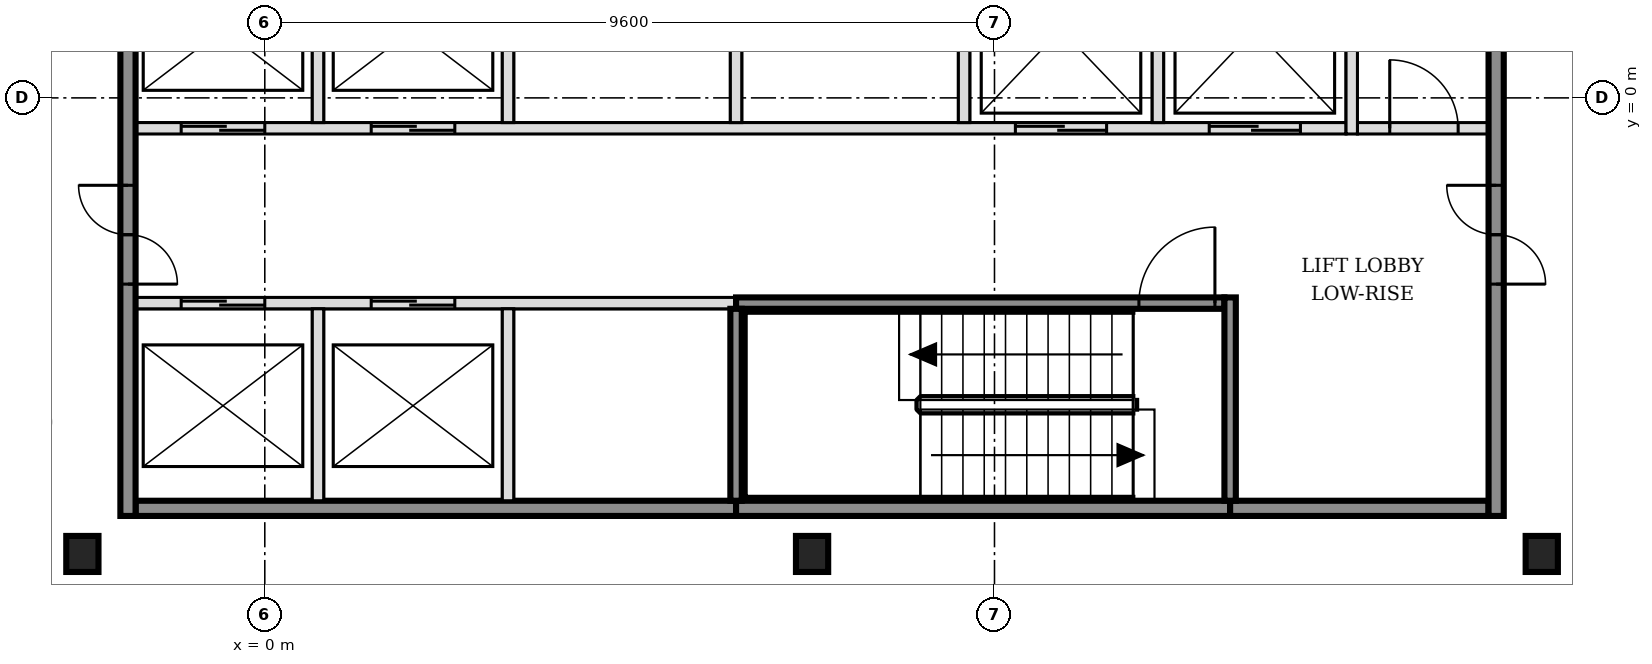
"""IFC4 building model, lengths in metres.
Left out: names, types, materials, properties, quantities, classifications, styles, units other than length and angle.
Written with IfcOpenShell. Run it as: python <this file> out.ifc"""

import sys

from ifc_helpers import new_model, si_unit, direction, frame, frame_2d, origin, origin_2d, place, context, subcontext, project, spatial, rectangle, i_section, extrude, element, fill, save


model = new_model("IFC4")
c1 = context("Model", 3, precision=1e-05, world=origin(), true_north=direction((0.0, 1.0)))
c2 = subcontext(c1, "Body", "Model", "MODEL_VIEW")
j1 = project(units=[si_unit("LENGTHUNIT", "METRE"), si_unit("PLANEANGLEUNIT", "RADIAN")], contexts=[c1])
p1 = place(None, origin())
s1 = spatial("IfcSite", under=j1, at=p1, CompositionType="ELEMENT")
p2 = place(p1, origin())
s2 = spatial("IfcBuilding", under=s1, at=p2, CompositionType="ELEMENT")
p3 = place(p2, frame((0.0, 0.0, 105.0)))
s3 = spatial("IfcBuildingStorey", under=s2, at=p3, CompositionType="ELEMENT", Elevation=105.0)
for number, where, z_axis, x_axis in (
    (1, (-2.4, -6.0, -0.15), (0.0, 0.0, 1.0), (1.0, 0.0, 0.0)),
    (2, (7.2, -6.0, -0.15), (0.0, 0.0, 1.0), (1.0, 0.0, 0.0)),
    (3, (16.8, -6.0, -0.15), (0.0, 0.0, 1.0), (1.0, 0.0, 0.0)),
):
    element("IfcColumn", number, at=place(p3, frame(where, z_axis=z_axis, x_axis=x_axis)), inside=s3, PredefinedType="COLUMN", context=c2, shape_type="SweptSolid", body=[
        extrude(i_section(OverallWidth=0.424, OverallDepth=0.474, WebThickness=0.048, FlangeThickness=0.077, FilletRadius=0.015, at=origin_2d()), origin(), (0.0, 0.0, 1.0), 3.6),
    ])
p4 = place(p3, frame((-1.7, -5.4, 0.0), z_axis=(0.0, 0.0, 1.0), x_axis=(1.0, 0.0, 0.0)))
e4 = element("IfcWall", 4, at=p4, inside=s3, PredefinedType="SOLIDWALL", context=c2, shape_type="SweptSolid", body=[
    extrude(rectangle(XDim=7.9, YDim=0.2, at=frame_2d((3.95, 0.0))), origin(), (0.0, 0.0, 1.0), 3.45),
])
p5 = place(p3, frame((6.2, -5.4, 0.0), z_axis=(0.0, 0.0, 1.0), x_axis=(1.0, 0.0, 0.0)))
e5 = element("IfcWall", 5, at=p5, inside=s3, PredefinedType="SOLIDWALL", context=c2, shape_type="SweptSolid", body=[
    extrude(rectangle(XDim=6.5, YDim=0.2, at=frame_2d((3.25, 0.0))), origin(), (0.0, 0.0, 1.0), 3.45),
])
p6 = place(p3, frame((12.7, -5.4, 0.0), z_axis=(0.0, 0.0, 1.0), x_axis=(1.0, 0.0, 0.0)))
e6 = element("IfcWall", 6, at=p6, inside=s3, PredefinedType="SOLIDWALL", context=c2, shape_type="SweptSolid", body=[
    extrude(rectangle(XDim=3.4, YDim=0.2, at=frame_2d((1.7, 0.0))), origin(), (0.0, 0.0, 1.0), 3.45),
])
p7 = place(p3, frame((-1.7, -2.7, 0.0), z_axis=(0.0, 0.0, 1.0), x_axis=(1.0, 0.0, 0.0)))
e7 = element("IfcWall", 7, at=p7, inside=s3, PredefinedType="SOLIDWALL", context=c2, shape_type="SweptSolid", body=[
    extrude(rectangle(XDim=7.9, YDim=0.15, at=frame_2d((3.95, 0.0))), origin(), (0.0, 0.0, 1.0), 3.45),
])
p8 = place(p7, frame((0.6, 0.0, 0.0)))
e8 = element("IfcOpeningElement", 8, at=p8, cuts=e7, PredefinedType="OPENING", context=c2, shape_type="SweptSolid", body=[
    extrude(rectangle(XDim=1.1, YDim=2.1, at=frame_2d((0.55, 1.05))), frame((0.0, 0.085, 0.0), z_axis=(0.0, -1.0, 0.0), x_axis=(1.0, 0.0, 0.0)), (0.0, 0.0, 1.0), 0.17),
])
p9 = place(p7, frame((3.1, 0.0, 0.0)))
e9 = element("IfcOpeningElement", 9, at=p9, cuts=e7, PredefinedType="OPENING", context=c2, shape_type="SweptSolid", body=[
    extrude(rectangle(XDim=1.1, YDim=2.1, at=frame_2d((0.55, 1.05))), frame((0.0, 0.085, 0.0), z_axis=(0.0, -1.0, 0.0), x_axis=(1.0, 0.0, 0.0)), (0.0, 0.0, 1.0), 0.17),
])
p10 = place(p3, frame((6.2, -2.7, 0.0), z_axis=(0.0, 0.0, 1.0), x_axis=(1.0, 0.0, 0.0)))
e10 = element("IfcWall", 10, at=p10, inside=s3, PredefinedType="SOLIDWALL", context=c2, shape_type="SweptSolid", body=[
    extrude(rectangle(XDim=6.425, YDim=0.15, at=frame_2d((3.212, 0.0))), origin(), (0.0, 0.0, 1.0), 3.45),
])
p11 = place(p10, frame((5.3, 0.0, 0.0)))
e11 = element("IfcOpeningElement", 11, at=p11, cuts=e10, PredefinedType="OPENING", context=c2, shape_type="SweptSolid", body=[
    extrude(rectangle(XDim=1.0, YDim=2.1, at=frame_2d((0.5, 1.05))), frame((0.0, 0.085, 0.0), z_axis=(0.0, -1.0, 0.0), x_axis=(1.0, 0.0, 0.0)), (0.0, 0.0, 1.0), 0.17),
])
p12 = place(p3, frame((-1.7, -0.4, 0.0), z_axis=(0.0, 0.0, 1.0), x_axis=(1.0, 0.0, 0.0)))
e12 = element("IfcWall", 12, at=p12, inside=s3, PredefinedType="SOLIDWALL", context=c2, shape_type="SweptSolid", body=[
    extrude(rectangle(XDim=15.925, YDim=0.15, at=frame_2d((7.962, 0.0))), origin(), (0.0, 0.0, 1.0), 3.45),
])
p13 = place(p12, frame((0.6, 0.0, 0.0)))
e13 = element("IfcOpeningElement", 13, at=p13, cuts=e12, PredefinedType="OPENING", context=c2, shape_type="SweptSolid", body=[
    extrude(rectangle(XDim=1.1, YDim=2.1, at=frame_2d((0.55, 1.05))), frame((0.0, 0.085, 0.0), z_axis=(0.0, -1.0, 0.0), x_axis=(1.0, 0.0, 0.0)), (0.0, 0.0, 1.0), 0.17),
])
p14 = place(p12, frame((3.1, 0.0, 0.0)))
e14 = element("IfcOpeningElement", 14, at=p14, cuts=e12, PredefinedType="OPENING", context=c2, shape_type="SweptSolid", body=[
    extrude(rectangle(XDim=1.1, YDim=2.1, at=frame_2d((0.55, 1.05))), frame((0.0, 0.085, 0.0), z_axis=(0.0, -1.0, 0.0), x_axis=(1.0, 0.0, 0.0)), (0.0, 0.0, 1.0), 0.17),
])
p15 = place(p12, frame((11.575, 0.0, 0.0)))
e15 = element("IfcOpeningElement", 15, at=p15, cuts=e12, PredefinedType="OPENING", context=c2, shape_type="SweptSolid", body=[
    extrude(rectangle(XDim=1.2, YDim=2.1, at=frame_2d((0.6, 1.05))), frame((0.0, 0.085, 0.0), z_axis=(0.0, -1.0, 0.0), x_axis=(1.0, 0.0, 0.0)), (0.0, 0.0, 1.0), 0.17),
])
p16 = place(p12, frame((14.125, 0.0, 0.0)))
e16 = element("IfcOpeningElement", 16, at=p16, cuts=e12, PredefinedType="OPENING", context=c2, shape_type="SweptSolid", body=[
    extrude(rectangle(XDim=1.2, YDim=2.1, at=frame_2d((0.6, 1.05))), frame((0.0, 0.085, 0.0), z_axis=(0.0, -1.0, 0.0), x_axis=(1.0, 0.0, 0.0)), (0.0, 0.0, 1.0), 0.17),
])
p17 = place(p3, frame((14.375, -0.4, 0.0), z_axis=(0.0, 0.0, 1.0), x_axis=(1.0, 0.0, 0.0)))
e17 = element("IfcWall", 17, at=p17, inside=s3, PredefinedType="PARTITIONING", context=c2, shape_type="SweptSolid", body=[
    extrude(rectangle(XDim=1.725, YDim=0.15, at=frame_2d((0.863, 0.0))), origin(), (0.0, 0.0, 1.0), 3.45),
])
p18 = place(p17, frame((0.425, 0.0, 0.0)))
e18 = element("IfcOpeningElement", 18, at=p18, cuts=e17, PredefinedType="OPENING", context=c2, shape_type="SweptSolid", body=[
    extrude(rectangle(XDim=0.9, YDim=2.1, at=frame_2d((0.45, 1.05))), frame((0.0, 0.085, 0.0), z_axis=(0.0, -1.0, 0.0), x_axis=(1.0, 0.0, 0.0)), (0.0, 0.0, 1.0), 0.17),
])
p19 = place(p3, frame((-1.8, -5.5, 0.0), z_axis=(0.0, 0.0, 1.0), x_axis=(0.0, 1.0, 0.0)))
e19 = element("IfcWall", 19, at=p19, inside=s3, PredefinedType="SOLIDWALL", context=c2, shape_type="SweptSolid", body=[
    extrude(rectangle(XDim=15.8, YDim=0.2, at=frame_2d((7.9, 0.0))), origin(), (0.0, 0.0, 1.0), 3.45),
])
p20 = place(p19, frame((3.05, 0.0, 0.0)))
e20 = element("IfcOpeningElement", 20, at=p20, cuts=e19, PredefinedType="OPENING", context=c2, shape_type="SweptSolid", body=[
    extrude(rectangle(XDim=1.3, YDim=2.1, at=frame_2d((0.65, 1.05))), frame((0.0, 0.11, 0.0), z_axis=(0.0, -1.0, 0.0), x_axis=(1.0, 0.0, 0.0)), (0.0, 0.0, 1.0), 0.22),
])
p21 = place(p19, frame((11.45, 0.0, 0.0)))
e21 = element("IfcOpeningElement", 21, at=p21, cuts=e19, PredefinedType="OPENING", context=c2, shape_type="SweptSolid", body=[
    extrude(rectangle(XDim=1.3, YDim=2.1, at=frame_2d((0.65, 1.05))), frame((0.0, 0.11, 0.0), z_axis=(0.0, -1.0, 0.0), x_axis=(1.0, 0.0, 0.0)), (0.0, 0.0, 1.0), 0.22),
])
p22 = place(p3, frame((0.7, -5.3, 0.0), z_axis=(0.0, 0.0, 1.0), x_axis=(0.0, 1.0, 0.0)))
e22 = element("IfcWall", 22, at=p22, inside=s3, PredefinedType="SOLIDWALL", context=c2, shape_type="SweptSolid", body=[
    extrude(rectangle(XDim=2.525, YDim=0.15, at=frame_2d((1.263, 0.0))), origin(), (0.0, 0.0, 1.0), 3.45),
])
p23 = place(p3, frame((0.7, -0.325, 0.0), z_axis=(0.0, 0.0, 1.0), x_axis=(0.0, 1.0, 0.0)))
e23 = element("IfcWall", 23, at=p23, inside=s3, PredefinedType="SOLIDWALL", context=c2, shape_type="SweptSolid", body=[
    extrude(rectangle(XDim=2.45, YDim=0.15, at=frame_2d((1.225, 0.0))), origin(), (0.0, 0.0, 1.0), 3.45),
])
p24 = place(p3, frame((3.2, -5.3, 0.0), z_axis=(0.0, 0.0, 1.0), x_axis=(0.0, 1.0, 0.0)))
e24 = element("IfcWall", 24, at=p24, inside=s3, PredefinedType="SOLIDWALL", context=c2, shape_type="SweptSolid", body=[
    extrude(rectangle(XDim=2.525, YDim=0.15, at=frame_2d((1.263, 0.0))), origin(), (0.0, 0.0, 1.0), 3.45),
])
p25 = place(p3, frame((3.2, -0.325, 0.0), z_axis=(0.0, 0.0, 1.0), x_axis=(0.0, 1.0, 0.0)))
e25 = element("IfcWall", 25, at=p25, inside=s3, PredefinedType="SOLIDWALL", context=c2, shape_type="SweptSolid", body=[
    extrude(rectangle(XDim=2.45, YDim=0.15, at=frame_2d((1.225, 0.0))), origin(), (0.0, 0.0, 1.0), 3.45),
])
p26 = place(p3, frame((6.2, -5.3, 0.0), z_axis=(0.0, 0.0, 1.0), x_axis=(0.0, 1.0, 0.0)))
e26 = element("IfcWall", 26, at=p26, inside=s3, PredefinedType="SOLIDWALL", context=c2, shape_type="SweptSolid", body=[
    extrude(rectangle(XDim=2.525, YDim=0.15, at=frame_2d((1.263, 0.0))), origin(), (0.0, 0.0, 1.0), 3.45),
])
for number, where, z_axis, x_axis in (
    (27, (6.2, -0.325, 0.0), (0.0, 0.0, 1.0), (0.0, 1.0, 0.0)),
    (28, (9.2, -0.325, 0.0), (0.0, 0.0, 1.0), (0.0, 1.0, 0.0)),
    (29, (11.75, -0.325, 0.0), (0.0, 0.0, 1.0), (0.0, 1.0, 0.0)),
):
    element("IfcWall", number, at=place(p3, frame(where, z_axis=z_axis, x_axis=x_axis)), inside=s3, PredefinedType="SOLIDWALL", context=c2, shape_type="SweptSolid", body=[
        extrude(rectangle(XDim=2.45, YDim=0.15, at=frame_2d((1.225, 0.0))), origin(), (0.0, 0.0, 1.0), 3.45),
    ])
p27 = place(p3, frame((12.7, -5.3, 0.0), z_axis=(0.0, 0.0, 1.0), x_axis=(0.0, 1.0, 0.0)))
e30 = element("IfcWall", 30, at=p27, inside=s3, PredefinedType="SOLIDWALL", context=c2, shape_type="SweptSolid", body=[
    extrude(rectangle(XDim=2.675, YDim=0.15, at=frame_2d((1.337, 0.0))), origin(), (0.0, 0.0, 1.0), 3.45),
])
p28 = place(p3, frame((14.3, -0.475, 0.0), z_axis=(0.0, 0.0, 1.0), x_axis=(0.0, 1.0, 0.0)))
e31 = element("IfcWall", 31, at=p28, inside=s3, PredefinedType="SOLIDWALL", context=c2, shape_type="SweptSolid", body=[
    extrude(rectangle(XDim=2.75, YDim=0.15, at=frame_2d((1.375, 0.0))), origin(), (0.0, 0.0, 1.0), 3.45),
])
p29 = place(p3, frame((16.2, -5.5, 0.0), z_axis=(0.0, 0.0, 1.0), x_axis=(0.0, 1.0, 0.0)))
e32 = element("IfcWall", 32, at=p29, inside=s3, PredefinedType="SOLIDWALL", context=c2, shape_type="SweptSolid", body=[
    extrude(rectangle(XDim=15.8, YDim=0.2, at=frame_2d((7.9, 0.0))), origin(), (0.0, 0.0, 1.0), 3.45),
])
p30 = place(p29, frame((3.05, 0.0, 0.0)))
e33 = element("IfcOpeningElement", 33, at=p30, cuts=e32, PredefinedType="OPENING", context=c2, shape_type="SweptSolid", body=[
    extrude(rectangle(XDim=1.3, YDim=2.1, at=frame_2d((0.65, 1.05))), frame((0.0, 0.11, 0.0), z_axis=(0.0, -1.0, 0.0), x_axis=(1.0, 0.0, 0.0)), (0.0, 0.0, 1.0), 0.22),
])
p31 = place(p29, frame((11.45, 0.0, 0.0)))
e34 = element("IfcOpeningElement", 34, at=p31, cuts=e32, PredefinedType="OPENING", context=c2, shape_type="SweptSolid", body=[
    extrude(rectangle(XDim=1.3, YDim=2.1, at=frame_2d((0.65, 1.05))), frame((0.0, 0.11, 0.0), z_axis=(0.0, -1.0, 0.0), x_axis=(1.0, 0.0, 0.0)), (0.0, 0.0, 1.0), 0.22),
])
p32 = place(p8, origin())
e35 = element("IfcDoor", 35, at=p32, inside=s3, OperationType="DOUBLE_DOOR_SLIDING", PredefinedType="DOOR", context=c2, shape_type="SweptSolid", body=[
    extrude(rectangle(XDim=1.1, YDim=2.1, at=frame_2d((0.55, 1.05))), frame((0.0, 0.025, 0.0), z_axis=(0.0, -1.0, 0.0), x_axis=(1.0, 0.0, 0.0)), (0.0, 0.0, 1.0), 0.05),
])
fill(e8, e35)
p33 = place(p9, origin())
e36 = element("IfcDoor", 36, at=p33, inside=s3, OperationType="DOUBLE_DOOR_SLIDING", PredefinedType="DOOR", context=c2, shape_type="SweptSolid", body=[
    extrude(rectangle(XDim=1.1, YDim=2.1, at=frame_2d((0.55, 1.05))), frame((0.0, 0.025, 0.0), z_axis=(0.0, -1.0, 0.0), x_axis=(1.0, 0.0, 0.0)), (0.0, 0.0, 1.0), 0.05),
])
fill(e9, e36)
p34 = place(p13, origin())
e37 = element("IfcDoor", 37, at=p34, inside=s3, OperationType="DOUBLE_DOOR_SLIDING", PredefinedType="DOOR", context=c2, shape_type="SweptSolid", body=[
    extrude(rectangle(XDim=1.1, YDim=2.1, at=frame_2d((0.55, 1.05))), frame((0.0, 0.025, 0.0), z_axis=(0.0, -1.0, 0.0), x_axis=(1.0, 0.0, 0.0)), (0.0, 0.0, 1.0), 0.05),
])
fill(e13, e37)
p35 = place(p14, origin())
e38 = element("IfcDoor", 38, at=p35, inside=s3, OperationType="DOUBLE_DOOR_SLIDING", PredefinedType="DOOR", context=c2, shape_type="SweptSolid", body=[
    extrude(rectangle(XDim=1.1, YDim=2.1, at=frame_2d((0.55, 1.05))), frame((0.0, 0.025, 0.0), z_axis=(0.0, -1.0, 0.0), x_axis=(1.0, 0.0, 0.0)), (0.0, 0.0, 1.0), 0.05),
])
fill(e14, e38)
p36 = place(p15, origin())
e39 = element("IfcDoor", 39, at=p36, inside=s3, OperationType="DOUBLE_DOOR_SLIDING", PredefinedType="DOOR", context=c2, shape_type="SweptSolid", body=[
    extrude(rectangle(XDim=1.2, YDim=2.1, at=frame_2d((0.6, 1.05))), frame((0.0, 0.025, 0.0), z_axis=(0.0, -1.0, 0.0), x_axis=(1.0, 0.0, 0.0)), (0.0, 0.0, 1.0), 0.05),
])
fill(e15, e39)
p37 = place(p16, origin())
e40 = element("IfcDoor", 40, at=p37, inside=s3, OperationType="DOUBLE_DOOR_SLIDING", PredefinedType="DOOR", context=c2, shape_type="SweptSolid", body=[
    extrude(rectangle(XDim=1.2, YDim=2.1, at=frame_2d((0.6, 1.05))), frame((0.0, 0.025, 0.0), z_axis=(0.0, -1.0, 0.0), x_axis=(1.0, 0.0, 0.0)), (0.0, 0.0, 1.0), 0.05),
])
fill(e16, e40)
p38 = place(p11, origin())
e41 = element("IfcDoor", 41, at=p38, inside=s3, OperationType="SINGLE_SWING_RIGHT", PredefinedType="DOOR", context=c2, shape_type="SweptSolid", body=[
    extrude(rectangle(XDim=1.0, YDim=2.1, at=frame_2d((0.5, 1.05))), frame((0.0, 0.025, 0.0), z_axis=(0.0, -1.0, 0.0), x_axis=(1.0, 0.0, 0.0)), (0.0, 0.0, 1.0), 0.05),
])
fill(e11, e41)
p39 = place(p20, origin())
e42 = element("IfcDoor", 42, at=p39, inside=s3, OperationType="DOUBLE_DOOR_SINGLE_SWING", PredefinedType="DOOR", context=c2, shape_type="SweptSolid", body=[
    extrude(rectangle(XDim=1.3, YDim=2.1, at=frame_2d((0.65, 1.05))), frame((0.0, 0.025, 0.0), z_axis=(0.0, -1.0, 0.0), x_axis=(1.0, 0.0, 0.0)), (0.0, 0.0, 1.0), 0.05),
])
fill(e20, e42)
p40 = place(p30, origin())
e43 = element("IfcDoor", 43, at=p40, inside=s3, OperationType="DOUBLE_DOOR_SINGLE_SWING", PredefinedType="DOOR", context=c2, shape_type="SweptSolid", body=[
    extrude(rectangle(XDim=1.3, YDim=2.1, at=frame_2d((0.65, 1.05))), frame((0.0, 0.025, 0.0), z_axis=(0.0, -1.0, 0.0), x_axis=(1.0, 0.0, 0.0)), (0.0, 0.0, 1.0), 0.05),
])
fill(e33, e43)
p41 = place(p18, origin())
e44 = element("IfcDoor", 44, at=p41, inside=s3, OperationType="SINGLE_SWING_LEFT", PredefinedType="DOOR", context=c2, shape_type="SweptSolid", body=[
    extrude(rectangle(XDim=0.9, YDim=2.1, at=frame_2d((0.45, 1.05))), frame((0.0, 0.025, 0.0), z_axis=(0.0, -1.0, 0.0), x_axis=(1.0, 0.0, 0.0)), (0.0, 0.0, 1.0), 0.05),
])
fill(e18, e44)
save(model, sys.argv[1])
